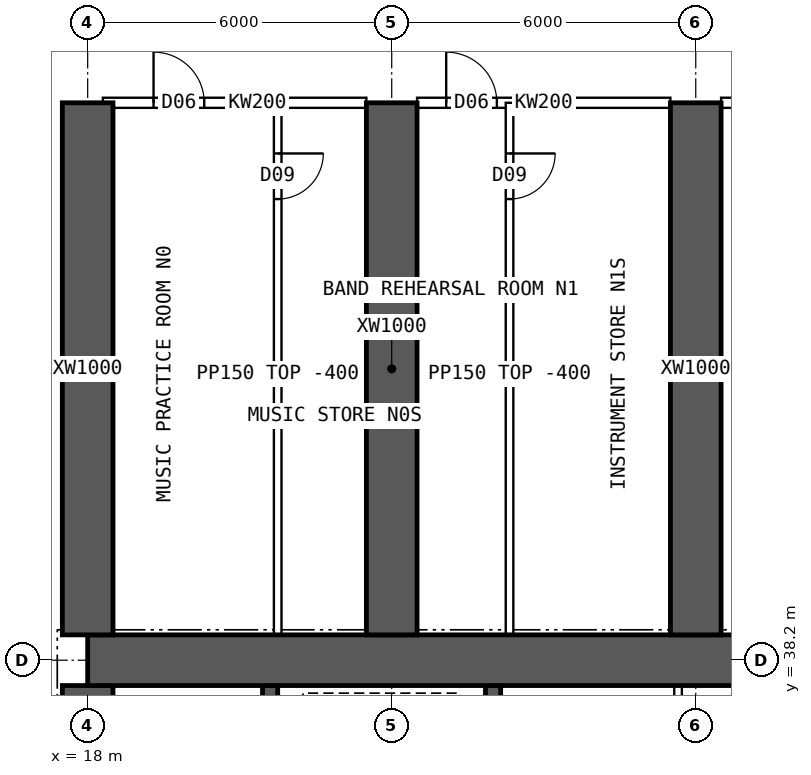
"""IFC4 building model, lengths in metres.
Left out: names, types, materials, properties, quantities, classifications, styles, units other than length and angle.
Written with IfcOpenShell. Run it as: python <this file> out.ifc"""

import sys

from ifc_helpers import new_model, si_unit, direction, frame, frame_2d, origin, place, context, subcontext, project, spatial, rectangle, extrude, element, fill, save


model = new_model("IFC4")
c1 = context("Model", 3, precision=1e-05, world=origin(), true_north=direction((0.0, 1.0)))
c2 = subcontext(c1, "Body", "Model", "MODEL_VIEW")
j1 = project(units=[si_unit("LENGTHUNIT", "METRE"), si_unit("PLANEANGLEUNIT", "RADIAN")], contexts=[c1])
p1 = place(None, origin())
s1 = spatial("IfcSite", under=j1, at=p1, CompositionType="ELEMENT")
p2 = place(p1, origin())
s2 = spatial("IfcBuilding", under=s1, at=p2, CompositionType="ELEMENT")
p3 = place(p2, frame((0.0, 0.0, 11.0)))
s3 = spatial("IfcBuildingStorey", under=s2, at=p3, CompositionType="ELEMENT", Elevation=11.0)
p4 = place(p3, frame((18.0, 38.2, 0.0), z_axis=(0.0, 0.0, 1.0), x_axis=(1.0, 0.0, 0.0)))
e1 = element("IfcWall", 1, at=p4, inside=s3, PredefinedType="SHEAR", context=c2, shape_type="SweptSolid", body=[
    extrude(rectangle(XDim=48.0, YDim=1.0, at=frame_2d((24.0, 0.0))), origin(), (0.0, 0.0, 1.0), 5.0),
])
p5 = place(p3, frame((18.0, 26.3, 0.0), z_axis=(0.0, 0.0, 1.0), x_axis=(0.0, 1.0, 0.0)))
e2 = element("IfcWall", 2, at=p5, inside=s3, PredefinedType="SHEAR", context=c2, shape_type="SweptSolid", body=[
    extrude(rectangle(XDim=11.4, YDim=1.0, at=frame_2d((5.7, 0.0))), origin(), (0.0, 0.0, 1.0), 5.0),
])
p6 = place(p5, frame((5.0, 0.0, 0.0)))
e3 = element("IfcOpeningElement", 3, at=p6, cuts=e2, PredefinedType="OPENING", context=c2, shape_type="SweptSolid", body=[
    extrude(rectangle(XDim=1.2, YDim=2.1, at=frame_2d((0.6, 1.05))), frame((0.0, 0.51, 0.0), z_axis=(0.0, -1.0, 0.0), x_axis=(1.0, 0.0, 0.0)), (0.0, 0.0, 1.0), 1.02),
])
for number, where, z_axis, x_axis in (
    (4, (21.6, 34.75, 0.0), (0.0, 0.0, 1.0), (0.0, 1.0, 0.0)),
    (5, (26.0, 34.75, 0.0), (0.0, 0.0, 1.0), (0.0, 1.0, 0.0)),
):
    element("IfcWall", number, at=place(p3, frame(where, z_axis=z_axis, x_axis=x_axis)), inside=s3, PredefinedType="SHEAR", context=c2, shape_type="SweptSolid", body=[
        extrude(rectangle(XDim=2.95, YDim=0.3, at=frame_2d((1.475, 0.0))), origin(), (0.0, 0.0, 1.0), 5.0),
    ])
for number, where, z_axis, x_axis in (
    (6, (18.0, 38.7, 0.0), (0.0, 0.0, 1.0), (0.0, 1.0, 0.0)),
    (7, (24.0, 38.7, 0.0), (0.0, 0.0, 1.0), (0.0, 1.0, 0.0)),
    (8, (30.0, 38.7, 0.0), (0.0, 0.0, 1.0), (0.0, 1.0, 0.0)),
):
    element("IfcWall", number, at=place(p3, frame(where, z_axis=z_axis, x_axis=x_axis)), inside=s3, PredefinedType="SHEAR", context=c2, shape_type="SweptSolid", body=[
        extrude(rectangle(XDim=10.5, YDim=1.0, at=frame_2d((5.25, 0.0))), origin(), (0.0, 0.0, 1.0), 5.0),
    ])
p7 = place(p3, frame((29.651, 34.75, 0.0), z_axis=(0.0, 0.0, 1.0), x_axis=(0.0, 1.0, 0.0)))
e9 = element("IfcWall", 9, at=p7, inside=s3, PredefinedType="SOLIDWALL", context=c2, shape_type="SweptSolid", body=[
    extrude(rectangle(XDim=2.95, YDim=0.15, at=frame_2d((1.475, 0.0))), origin(), (0.0, 0.0, 1.0), 4.6),
])
p8 = place(p3, frame((21.75, 38.5, 0.0), z_axis=(0.0, 0.0, 1.0), x_axis=(0.0, 1.0, 0.0)))
e10 = element("IfcWall", 10, at=p8, inside=s3, PredefinedType="PARTITIONING", context=c2, shape_type="SweptSolid", body=[
    extrude(rectangle(XDim=10.7, YDim=0.15, at=frame_2d((5.35, 0.0))), origin(), (0.0, 0.0, 1.0), 4.6),
])
p9 = place(p8, frame((8.8, 0.0, 0.0)))
e11 = element("IfcOpeningElement", 11, at=p9, cuts=e10, PredefinedType="OPENING", context=c2, shape_type="SweptSolid", body=[
    extrude(rectangle(XDim=0.9, YDim=2.1, at=frame_2d((0.45, 1.05))), frame((0.0, 0.085, 0.0), z_axis=(0.0, -1.0, 0.0), x_axis=(1.0, 0.0, 0.0)), (0.0, 0.0, 1.0), 0.17),
])
p10 = place(p3, frame((26.325, 38.5, 0.0), z_axis=(0.0, 0.0, 1.0), x_axis=(0.0, 1.0, 0.0)))
e12 = element("IfcWall", 12, at=p10, inside=s3, PredefinedType="PARTITIONING", context=c2, shape_type="SweptSolid", body=[
    extrude(rectangle(XDim=10.7, YDim=0.15, at=frame_2d((5.35, 0.0))), origin(), (0.0, 0.0, 1.0), 4.6),
])
p11 = place(p10, frame((8.8, 0.0, 0.0)))
e13 = element("IfcOpeningElement", 13, at=p11, cuts=e12, PredefinedType="OPENING", context=c2, shape_type="SweptSolid", body=[
    extrude(rectangle(XDim=0.9, YDim=2.1, at=frame_2d((0.45, 1.05))), frame((0.0, 0.085, 0.0), z_axis=(0.0, -1.0, 0.0), x_axis=(1.0, 0.0, 0.0)), (0.0, 0.0, 1.0), 0.17),
])
p12 = place(p3, frame((18.3, 49.2, 0.0), z_axis=(0.0, 0.0, 1.0), x_axis=(1.0, 0.0, 0.0)))
e14 = element("IfcWall", 14, at=p12, inside=s3, PredefinedType="SOLIDWALL", context=c2, shape_type="SweptSolid", body=[
    extrude(rectangle(XDim=5.2, YDim=0.2, at=frame_2d((2.6, 0.0))), origin(), (0.0, 0.0, 1.0), 4.6),
])
p13 = place(p12, frame((1.0, 0.0, 0.0)))
e15 = element("IfcOpeningElement", 15, at=p13, cuts=e14, PredefinedType="OPENING", context=c2, shape_type="SweptSolid", body=[
    extrude(rectangle(XDim=1.0, YDim=2.1, at=frame_2d((0.5, 1.05))), frame((0.0, 0.11, 0.0), z_axis=(0.0, -1.0, 0.0), x_axis=(1.0, 0.0, 0.0)), (0.0, 0.0, 1.0), 0.22),
])
p14 = place(p3, frame((24.5, 49.2, 0.0), z_axis=(0.0, 0.0, 1.0), x_axis=(1.0, 0.0, 0.0)))
e16 = element("IfcWall", 16, at=p14, inside=s3, PredefinedType="SOLIDWALL", context=c2, shape_type="SweptSolid", body=[
    extrude(rectangle(XDim=5.0, YDim=0.2, at=frame_2d((2.5, 0.0))), origin(), (0.0, 0.0, 1.0), 4.6),
])
p15 = place(p14, frame((0.575, 0.0, 0.0)))
e17 = element("IfcOpeningElement", 17, at=p15, cuts=e16, PredefinedType="OPENING", context=c2, shape_type="SweptSolid", body=[
    extrude(rectangle(XDim=1.0, YDim=2.1, at=frame_2d((0.5, 1.05))), frame((0.0, 0.11, 0.0), z_axis=(0.0, -1.0, 0.0), x_axis=(1.0, 0.0, 0.0)), (0.0, 0.0, 1.0), 0.22),
])
p16 = place(p3, frame((30.5, 49.2, 0.0), z_axis=(0.0, 0.0, 1.0), x_axis=(1.0, 0.0, 0.0)))
e18 = element("IfcWall", 18, at=p16, inside=s3, PredefinedType="SOLIDWALL", context=c2, shape_type="SweptSolid", body=[
    extrude(rectangle(XDim=5.0, YDim=0.2, at=frame_2d((2.5, 0.0))), origin(), (0.0, 0.0, 1.0), 4.6),
])
p17 = place(p16, frame((0.8, 0.0, 0.0)))
e19 = element("IfcOpeningElement", 19, at=p17, cuts=e18, PredefinedType="OPENING", context=c2, shape_type="SweptSolid", body=[
    extrude(rectangle(XDim=1.0, YDim=2.1, at=frame_2d((0.5, 1.05))), frame((0.0, 0.11, 0.0), z_axis=(0.0, -1.0, 0.0), x_axis=(1.0, 0.0, 0.0)), (0.0, 0.0, 1.0), 0.22),
])
p18 = place(p9, origin())
e20 = element("IfcDoor", 20, at=p18, inside=s3, OperationType="SINGLE_SWING_RIGHT", PredefinedType="DOOR", context=c2, shape_type="SweptSolid", body=[
    extrude(rectangle(XDim=0.9, YDim=2.1, at=frame_2d((0.45, 1.05))), frame((0.0, 0.025, 0.0), z_axis=(0.0, -1.0, 0.0), x_axis=(1.0, 0.0, 0.0)), (0.0, 0.0, 1.0), 0.05),
])
fill(e11, e20)
p19 = place(p11, origin())
e21 = element("IfcDoor", 21, at=p19, inside=s3, OperationType="SINGLE_SWING_RIGHT", PredefinedType="DOOR", context=c2, shape_type="SweptSolid", body=[
    extrude(rectangle(XDim=0.9, YDim=2.1, at=frame_2d((0.45, 1.05))), frame((0.0, 0.025, 0.0), z_axis=(0.0, -1.0, 0.0), x_axis=(1.0, 0.0, 0.0)), (0.0, 0.0, 1.0), 0.05),
])
fill(e13, e21)
p20 = place(p13, origin())
e22 = element("IfcDoor", 22, at=p20, inside=s3, OperationType="SINGLE_SWING_LEFT", PredefinedType="DOOR", context=c2, shape_type="SweptSolid", body=[
    extrude(rectangle(XDim=1.0, YDim=2.1, at=frame_2d((0.5, 1.05))), frame((0.0, 0.025, 0.0), z_axis=(0.0, -1.0, 0.0), x_axis=(1.0, 0.0, 0.0)), (0.0, 0.0, 1.0), 0.05),
])
fill(e15, e22)
p21 = place(p15, origin())
e23 = element("IfcDoor", 23, at=p21, inside=s3, OperationType="SINGLE_SWING_LEFT", PredefinedType="DOOR", context=c2, shape_type="SweptSolid", body=[
    extrude(rectangle(XDim=1.0, YDim=2.1, at=frame_2d((0.5, 1.05))), frame((0.0, 0.025, 0.0), z_axis=(0.0, -1.0, 0.0), x_axis=(1.0, 0.0, 0.0)), (0.0, 0.0, 1.0), 0.05),
])
fill(e17, e23)
save(model, sys.argv[1])
